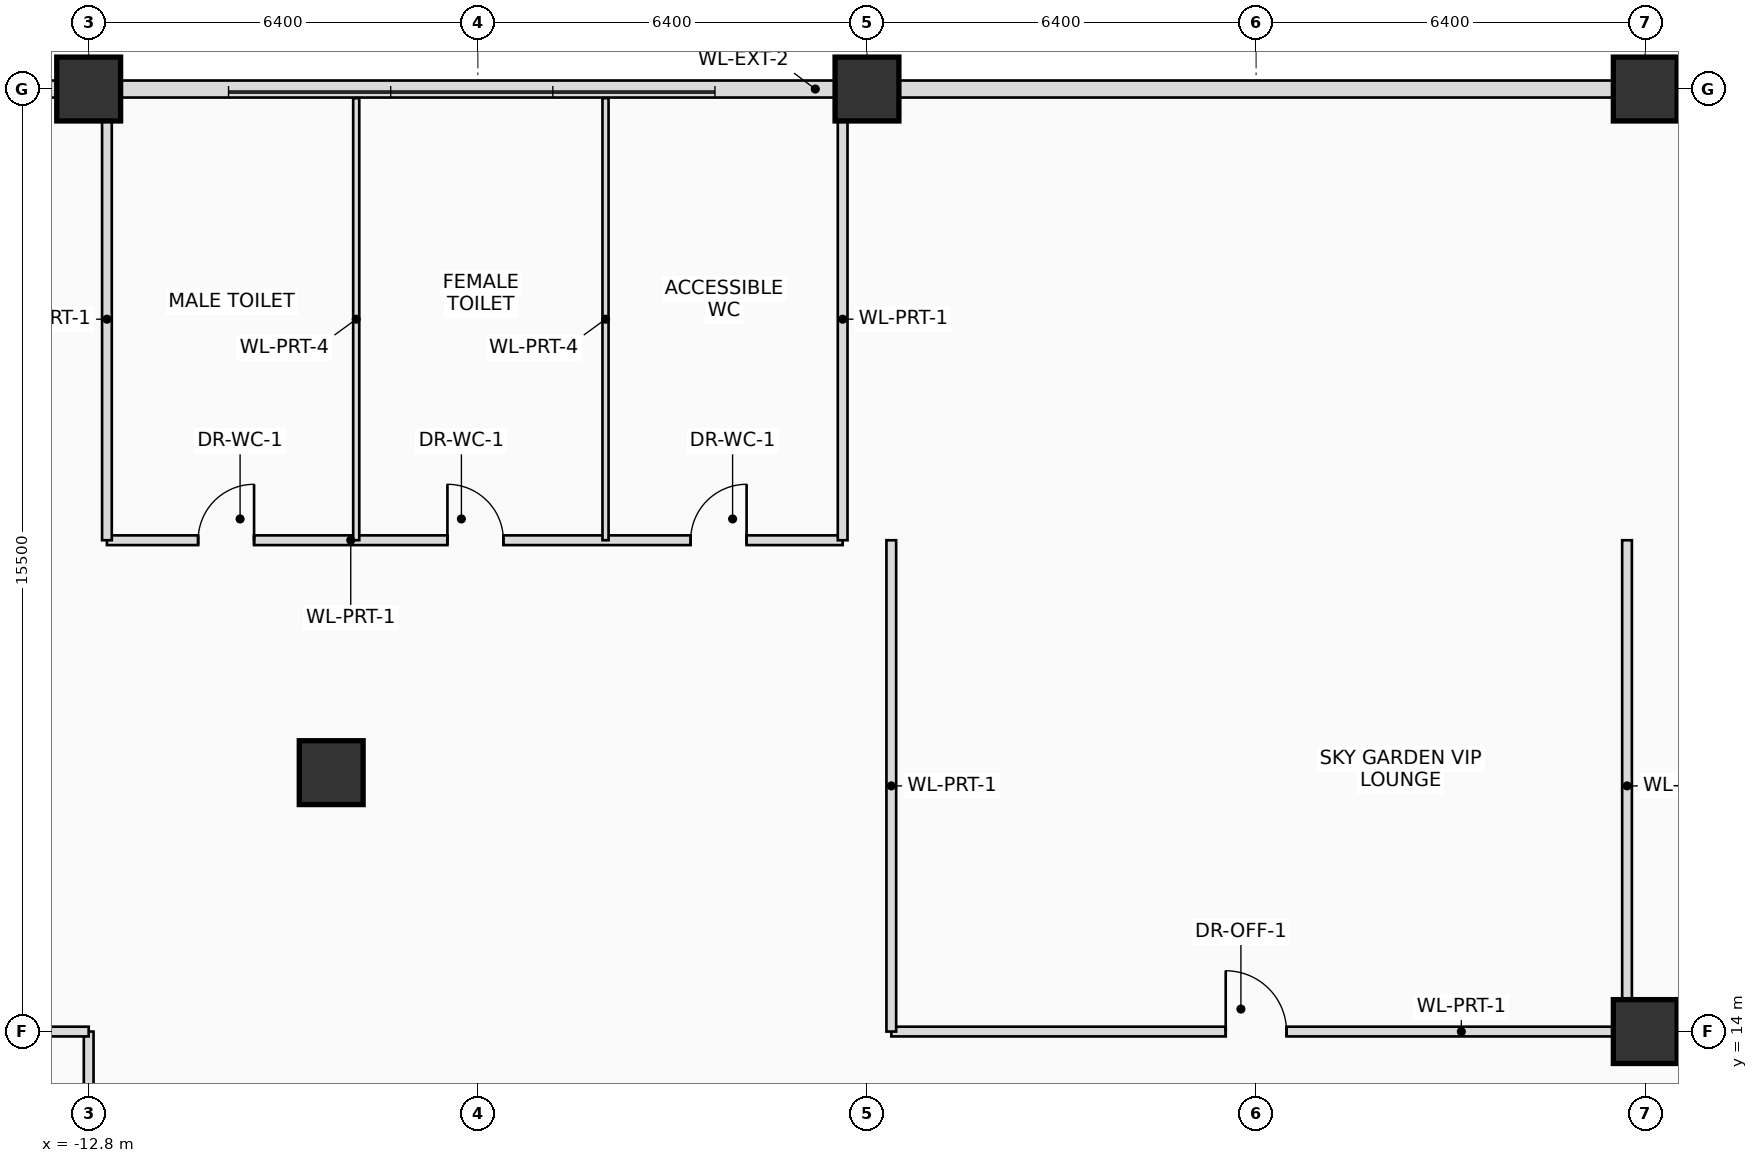
"""IFC4 building model, lengths in metres.
Left out: names, types, materials, properties, quantities, classifications, styles, units other than length and angle.
Written with IfcOpenShell. Run it as: python <this file> out.ifc"""

import sys

from ifc_helpers import new_model, si_unit, direction, frame, frame_2d, origin, origin_2d, place, context, subcontext, project, spatial, rectangle, extrude, source, transform, mapped, element, fill, save


model = new_model("IFC4")
c1 = context("Model", 3, precision=1e-05, world=origin(), true_north=direction((0.0, 1.0)))
c2 = subcontext(c1, "Body", "Model", "MODEL_VIEW")
j1 = project(units=[si_unit("LENGTHUNIT", "METRE"), si_unit("PLANEANGLEUNIT", "RADIAN")], contexts=[c1])
p1 = place(None, origin())
s1 = spatial("IfcSite", under=j1, at=p1, CompositionType="ELEMENT")
p2 = place(p1, origin())
s2 = spatial("IfcBuilding", under=s1, at=p2, CompositionType="ELEMENT")
p3 = place(p2, frame((0.0, 0.0, 16.2)))
s3 = spatial("IfcBuildingStorey", under=s2, at=p3, CompositionType="ELEMENT", Elevation=16.2)
m1 = source(origin(), c2, "Body", "SweptSolid", [
    extrude(rectangle(XDim=1.05, YDim=1.05, at=origin_2d()), origin(), (0.0, 0.0, 1.0), 3.58),
])
for number, where, z_axis, x_axis in (
    (1, (12.8, 14.0, 0.0), (0.0, 0.0, 1.0), (1.0, 0.0, 0.0)),
    (2, (-12.8, 29.5, 0.0), (0.0, 0.0, 1.0), (1.0, 0.0, 0.0)),
    (3, (0.0, 29.5, 0.0), (0.0, 0.0, 1.0), (1.0, 0.0, 0.0)),
    (4, (12.8, 29.5, 0.0), (0.0, 0.0, 1.0), (1.0, 0.0, 0.0)),
    (5, (-8.812, 18.258, 0.0), (0.0, 0.0, 1.0), (1.0, 0.0, 0.0)),
):
    element("IfcColumn", number, at=place(p3, frame(where, z_axis=z_axis, x_axis=x_axis)), inside=s3, PredefinedType="COLUMN", context=c2, shape_type="MappedRepresentation", body=[
        mapped(m1, transform((0.0, 0.0, 0.0), scale=1.0)),
    ])
p4 = place(p3, frame((-34.0, 29.5, 0.0), z_axis=(0.0, 0.0, 1.0), x_axis=(1.0, 0.0, 0.0)))
e6 = element("IfcWall", 6, at=p4, inside=s3, PredefinedType="SOLIDWALL", context=c2, shape_type="SweptSolid", body=[
    extrude(rectangle(XDim=68.0, YDim=0.28, at=frame_2d((34.0, 0.0))), origin(), (0.0, 0.0, 1.0), 2.64),
])
p5 = place(p4, frame((15.8, 0.0, 0.65)))
e7 = element("IfcOpeningElement", 7, at=p5, cuts=e6, PredefinedType="OPENING", context=c2, shape_type="SweptSolid", body=[
    extrude(rectangle(XDim=1.5, YDim=1.8, at=frame_2d((0.75, 0.9))), frame((0.0, 0.15, 0.0), z_axis=(0.0, -1.0, 0.0), x_axis=(1.0, 0.0, 0.0)), (0.0, 0.0, 1.0), 0.3),
])
p6 = place(p4, frame((49.0, 0.0, 0.65)))
e8 = element("IfcOpeningElement", 8, at=p6, cuts=e6, PredefinedType="OPENING", context=c2, shape_type="SweptSolid", body=[
    extrude(rectangle(XDim=1.5, YDim=1.8, at=frame_2d((0.75, 0.9))), frame((0.0, 0.15, 0.0), z_axis=(0.0, -1.0, 0.0), x_axis=(1.0, 0.0, 0.0)), (0.0, 0.0, 1.0), 0.3),
])
p7 = place(p3, frame((-12.5, 22.08, 0.0), z_axis=(0.0, 0.0, 1.0), x_axis=(1.0, 0.0, 0.0)))
e9 = element("IfcWall", 9, at=p7, inside=s3, PredefinedType="PARTITIONING", context=c2, shape_type="SweptSolid", body=[
    extrude(rectangle(XDim=12.1, YDim=0.16, at=frame_2d((6.05, 0.0))), origin(), (0.0, 0.0, 1.0), 3.56),
])
p8 = place(p7, frame((1.5, 0.0, 0.0)))
e10 = element("IfcOpeningElement", 10, at=p8, cuts=e9, PredefinedType="OPENING", context=c2, shape_type="SweptSolid", body=[
    extrude(rectangle(XDim=0.92, YDim=2.1, at=frame_2d((0.46, 1.05))), frame((0.0, 0.09, 0.0), z_axis=(0.0, -1.0, 0.0), x_axis=(1.0, 0.0, 0.0)), (0.0, 0.0, 1.0), 0.18),
])
p9 = place(p7, frame((5.6, 0.0, 0.0)))
e11 = element("IfcOpeningElement", 11, at=p9, cuts=e9, PredefinedType="OPENING", context=c2, shape_type="SweptSolid", body=[
    extrude(rectangle(XDim=0.92, YDim=2.1, at=frame_2d((0.46, 1.05))), frame((0.0, 0.09, 0.0), z_axis=(0.0, -1.0, 0.0), x_axis=(1.0, 0.0, 0.0)), (0.0, 0.0, 1.0), 0.18),
])
p10 = place(p7, frame((9.6, 0.0, 0.0)))
e12 = element("IfcOpeningElement", 12, at=p10, cuts=e9, PredefinedType="OPENING", context=c2, shape_type="SweptSolid", body=[
    extrude(rectangle(XDim=0.92, YDim=2.1, at=frame_2d((0.46, 1.05))), frame((0.0, 0.09, 0.0), z_axis=(0.0, -1.0, 0.0), x_axis=(1.0, 0.0, 0.0)), (0.0, 0.0, 1.0), 0.18),
])
p11 = place(p3, frame((-12.5, 22.08, 0.0), z_axis=(0.0, 0.0, 1.0), x_axis=(0.0, 1.0, 0.0)))
e13 = element("IfcWall", 13, at=p11, inside=s3, PredefinedType="PARTITIONING", context=c2, shape_type="SweptSolid", body=[
    extrude(rectangle(XDim=7.27, YDim=0.16, at=frame_2d((3.635, 0.0))), origin(), (0.0, 0.0, 1.0), 3.56),
])
for number, where, z_axis, x_axis in (
    (14, (-8.4, 22.08, 0.0), (0.0, 0.0, 1.0), (0.0, 1.0, 0.0)),
    (15, (-4.3, 22.08, 0.0), (0.0, 0.0, 1.0), (0.0, 1.0, 0.0)),
):
    element("IfcWall", number, at=place(p3, frame(where, z_axis=z_axis, x_axis=x_axis)), inside=s3, PredefinedType="PARTITIONING", context=c2, shape_type="SweptSolid", body=[
        extrude(rectangle(XDim=7.27, YDim=0.1, at=frame_2d((3.635, 0.0))), origin(), (0.0, 0.0, 1.0), 3.56),
    ])
p12 = place(p3, frame((-0.4, 22.08, 0.0), z_axis=(0.0, 0.0, 1.0), x_axis=(0.0, 1.0, 0.0)))
e16 = element("IfcWall", 16, at=p12, inside=s3, PredefinedType="PARTITIONING", context=c2, shape_type="SweptSolid", body=[
    extrude(rectangle(XDim=7.27, YDim=0.16, at=frame_2d((3.635, 0.0))), origin(), (0.0, 0.0, 1.0), 3.56),
])
p13 = place(p3, frame((-12.8, -27.35, 0.0), z_axis=(0.0, 0.0, 1.0), x_axis=(0.0, 1.0, 0.0)))
e17 = element("IfcWall", 17, at=p13, inside=s3, PredefinedType="PARTITIONING", context=c2, shape_type="SweptSolid", body=[
    extrude(rectangle(XDim=41.35, YDim=0.16, at=frame_2d((20.675, 0.0))), origin(), (0.0, 0.0, 1.0), 3.015),
])
p14 = place(p13, frame((8.4, 0.0, 0.0)))
e18 = element("IfcOpeningElement", 18, at=p14, cuts=e17, PredefinedType="OPENING", context=c2, shape_type="SweptSolid", body=[
    extrude(rectangle(XDim=1.0, YDim=2.25, at=frame_2d((0.5, 1.125))), frame((0.0, 0.09, 0.0), z_axis=(0.0, -1.0, 0.0), x_axis=(1.0, 0.0, 0.0)), (0.0, 0.0, 1.0), 0.18),
])
p15 = place(p3, frame((-33.8, 14.0, 0.0), z_axis=(0.0, 0.0, 1.0), x_axis=(1.0, 0.0, 0.0)))
e19 = element("IfcWall", 19, at=p15, inside=s3, PredefinedType="PARTITIONING", context=c2, shape_type="SweptSolid", body=[
    extrude(rectangle(XDim=21.0, YDim=0.16, at=frame_2d((10.5, 0.0))), origin(), (0.0, 0.0, 1.0), 3.015),
])
p16 = place(p15, frame((15.5, 0.0, 0.0)))
e20 = element("IfcOpeningElement", 20, at=p16, cuts=e19, PredefinedType="OPENING", context=c2, shape_type="SweptSolid", body=[
    extrude(rectangle(XDim=1.0, YDim=2.25, at=frame_2d((0.5, 1.125))), frame((0.0, 0.09, 0.0), z_axis=(0.0, -1.0, 0.0), x_axis=(1.0, 0.0, 0.0)), (0.0, 0.0, 1.0), 0.18),
])
p17 = place(p3, frame((0.4, 14.0, 0.0), z_axis=(0.0, 0.0, 1.0), x_axis=(1.0, 0.0, 0.0)))
e21 = element("IfcWall", 21, at=p17, inside=s3, PredefinedType="PARTITIONING", context=c2, shape_type="SweptSolid", body=[
    extrude(rectangle(XDim=12.1, YDim=0.16, at=frame_2d((6.05, 0.0))), origin(), (0.0, 0.0, 1.0), 3.56),
])
p18 = place(p17, frame((5.5, 0.0, 0.0)))
e22 = element("IfcOpeningElement", 22, at=p18, cuts=e21, PredefinedType="OPENING", context=c2, shape_type="SweptSolid", body=[
    extrude(rectangle(XDim=1.0, YDim=2.25, at=frame_2d((0.5, 1.125))), frame((0.0, 0.09, 0.0), z_axis=(0.0, -1.0, 0.0), x_axis=(1.0, 0.0, 0.0)), (0.0, 0.0, 1.0), 0.18),
])
for number, where, z_axis, x_axis in (
    (23, (0.4, 14.0, 0.0), (0.0, 0.0, 1.0), (0.0, 1.0, 0.0)),
    (24, (12.5, 14.0, 0.0), (0.0, 0.0, 1.0), (0.0, 1.0, 0.0)),
):
    element("IfcWall", number, at=place(p3, frame(where, z_axis=z_axis, x_axis=x_axis)), inside=s3, PredefinedType="PARTITIONING", context=c2, shape_type="SweptSolid", body=[
        extrude(rectangle(XDim=8.08, YDim=0.16, at=frame_2d((4.04, 0.0))), origin(), (0.0, 0.0, 1.0), 3.56),
    ])
p19 = place(p8, origin())
e25 = element("IfcDoor", 25, at=p19, inside=s3, OperationType="SINGLE_SWING_RIGHT", PredefinedType="DOOR", context=c2, shape_type="SweptSolid", body=[
    extrude(rectangle(XDim=0.92, YDim=2.1, at=frame_2d((0.46, 1.05))), frame((0.0, 0.025, 0.0), z_axis=(0.0, -1.0, 0.0), x_axis=(1.0, 0.0, 0.0)), (0.0, 0.0, 1.0), 0.05),
])
fill(e10, e25)
p20 = place(p9, origin())
e26 = element("IfcDoor", 26, at=p20, inside=s3, OperationType="SINGLE_SWING_LEFT", PredefinedType="DOOR", context=c2, shape_type="SweptSolid", body=[
    extrude(rectangle(XDim=0.92, YDim=2.1, at=frame_2d((0.46, 1.05))), frame((0.0, 0.025, 0.0), z_axis=(0.0, -1.0, 0.0), x_axis=(1.0, 0.0, 0.0)), (0.0, 0.0, 1.0), 0.05),
])
fill(e11, e26)
p21 = place(p10, origin())
e27 = element("IfcDoor", 27, at=p21, inside=s3, OperationType="SINGLE_SWING_RIGHT", PredefinedType="DOOR", context=c2, shape_type="SweptSolid", body=[
    extrude(rectangle(XDim=0.92, YDim=2.1, at=frame_2d((0.46, 1.05))), frame((0.0, 0.025, 0.0), z_axis=(0.0, -1.0, 0.0), x_axis=(1.0, 0.0, 0.0)), (0.0, 0.0, 1.0), 0.05),
])
fill(e12, e27)
p22 = place(p18, origin())
e28 = element("IfcDoor", 28, at=p22, inside=s3, OperationType="SINGLE_SWING_LEFT", PredefinedType="DOOR", context=c2, shape_type="SweptSolid", body=[
    extrude(rectangle(XDim=1.0, YDim=2.25, at=frame_2d((0.5, 1.125))), frame((0.0, 0.025, 0.0), z_axis=(0.0, -1.0, 0.0), x_axis=(1.0, 0.0, 0.0)), (0.0, 0.0, 1.0), 0.05),
])
fill(e22, e28)
save(model, sys.argv[1])
